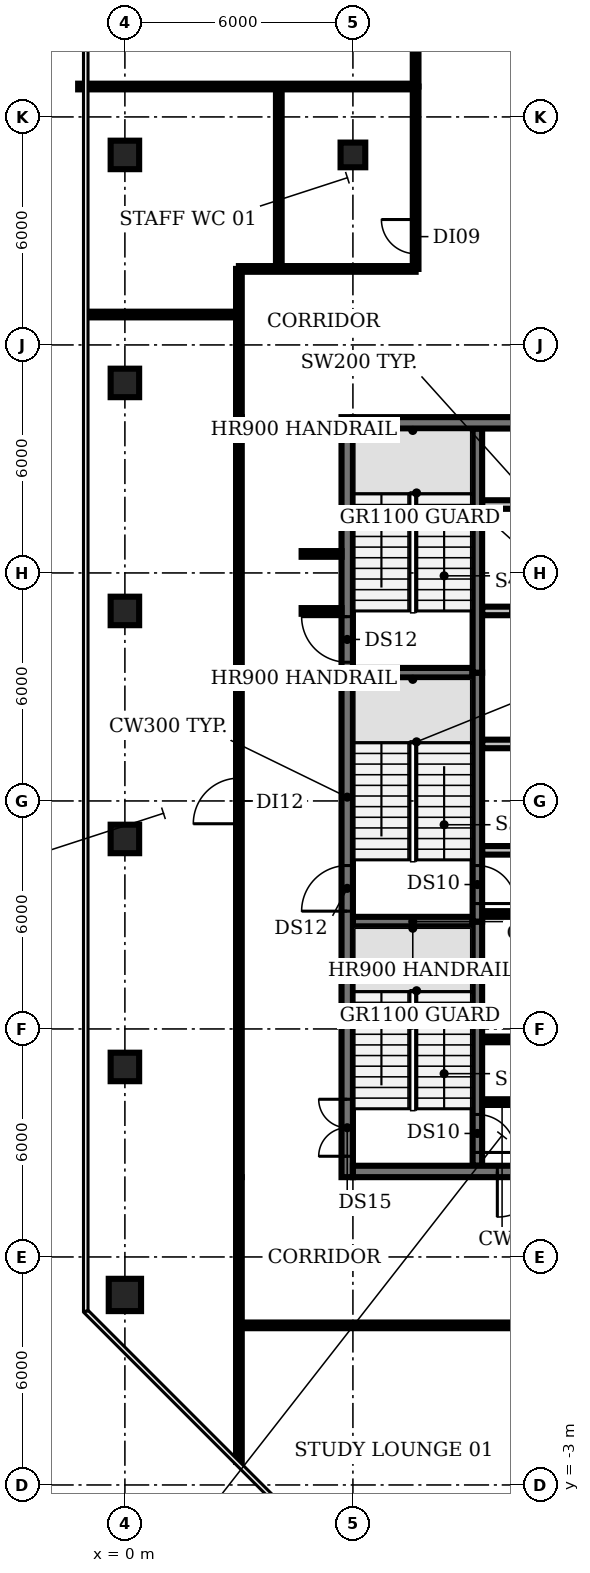
"""IFC4 building model, lengths in metres.
Left out: names, types, materials, properties, quantities, classifications, styles, units other than length and angle.
Written with IfcOpenShell. Run it as: python <this file> out.ifc"""

import sys

from ifc_helpers import new_model, si_unit, direction, frame, frame_2d, origin, origin_2d, place, context, subcontext, project, spatial, rectangle, circle, extrude, element, fill, save


model = new_model("IFC4")
c1 = context("Model", 3, precision=1e-05, world=origin(), true_north=direction((0.0, 1.0)))
c2 = subcontext(c1, "Body", "Model", "MODEL_VIEW")
j1 = project(units=[si_unit("LENGTHUNIT", "METRE"), si_unit("PLANEANGLEUNIT", "RADIAN")], contexts=[c1])
p1 = place(None, origin())
s1 = spatial("IfcSite", under=j1, at=p1, CompositionType="ELEMENT")
p2 = place(p1, origin())
s2 = spatial("IfcBuilding", under=s1, at=p2, CompositionType="ELEMENT")
p3 = place(p2, frame((0.0, 0.0, 297.8)))
s3 = spatial("IfcBuildingStorey", under=s2, at=p3, CompositionType="ELEMENT", Elevation=297.8)
p4 = place(p3, frame((0.0, 2.0, 0.0), z_axis=(0.0, 0.0, 1.0), x_axis=(1.0, 0.0, 0.0)))
e1 = element("IfcColumn", 1, at=p4, inside=s3, PredefinedType="COLUMN", context=c2, shape_type="SweptSolid", body=[
    extrude(circle(Radius=0.425, at=origin_2d()), origin(), (0.0, 0.0, 1.0), 3.85),
])
for number, where, z_axis, x_axis in (
    (2, (0.0, 8.0, 0.0), (0.0, 0.0, 1.0), (1.0, 0.0, 0.0)),
    (3, (0.0, 14.0, 0.0), (0.0, 0.0, 1.0), (1.0, 0.0, 0.0)),
    (4, (0.0, 20.0, 0.0), (0.0, 0.0, 1.0), (1.0, 0.0, 0.0)),
    (5, (0.0, 26.0, 0.0), (0.0, 0.0, 1.0), (1.0, 0.0, 0.0)),
    (6, (0.0, 32.0, 0.0), (0.0, 0.0, 1.0), (1.0, 0.0, 0.0)),
):
    element("IfcColumn", number, at=place(p3, frame(where, z_axis=z_axis, x_axis=x_axis)), inside=s3, PredefinedType="COLUMN", context=c2, shape_type="SweptSolid", body=[
        extrude(rectangle(XDim=0.75, YDim=0.75, at=origin_2d()), origin(), (0.0, 0.0, 1.0), 3.85),
    ])
p5 = place(p3, frame((6.0, 32.0, 0.0), z_axis=(0.0, 0.0, 1.0), x_axis=(1.0, 0.0, 0.0)))
e7 = element("IfcColumn", 7, at=p5, inside=s3, PredefinedType="COLUMN", context=c2, shape_type="SweptSolid", body=[
    extrude(rectangle(XDim=0.65, YDim=0.65, at=origin_2d()), origin(), (0.0, 0.0, 1.0), 3.85),
])
for number, where, z_axis, x_axis in (
    (8, (9.4, 7.075, 0.0), (0.0, 0.0, 1.0), (1.0, 0.0, 0.0)),
    (9, (9.4, 8.725, 0.0), (0.0, 0.0, 1.0), (1.0, 0.0, 0.0)),
    (10, (9.4, 10.375, 0.0), (0.0, 0.0, 1.0), (1.0, 0.0, 0.0)),
):
    element("IfcWall", number, at=place(p3, frame(where, z_axis=z_axis, x_axis=x_axis)), inside=s3, PredefinedType="SHEAR", context=c2, shape_type="SweptSolid", body=[
        extrude(rectangle(XDim=1.05, YDim=0.15, at=frame_2d((0.525, 0.0))), origin(), (0.0, 0.0, 1.0), 3.85),
    ])
p6 = place(p3, frame((6.0, 11.825, 0.0), z_axis=(0.0, 0.0, 1.0), x_axis=(1.0, 0.0, 0.0)))
e11 = element("IfcWall", 11, at=p6, inside=s3, PredefinedType="SHEAR", context=c2, shape_type="SweptSolid", body=[
    extrude(rectangle(XDim=3.15, YDim=0.25, at=frame_2d((1.575, 0.0))), origin(), (0.0, 0.0, 1.0), 3.85),
])
p7 = place(p3, frame((9.4, 12.025, 0.0), z_axis=(0.0, 0.0, 1.0), x_axis=(1.0, 0.0, 0.0)))
e12 = element("IfcWall", 12, at=p7, inside=s3, PredefinedType="SHEAR", context=c2, shape_type="SweptSolid", body=[
    extrude(rectangle(XDim=1.05, YDim=0.15, at=frame_2d((0.525, 0.0))), origin(), (0.0, 0.0, 1.0), 3.85),
])
p8 = place(p3, frame((9.4, 13.7, 0.0), z_axis=(0.0, 0.0, 1.0), x_axis=(1.0, 0.0, 0.0)))
e13 = element("IfcWall", 13, at=p8, inside=s3, PredefinedType="PARTITIONING", context=c2, shape_type="SweptSolid", body=[
    extrude(rectangle(XDim=4.0, YDim=0.225, at=frame_2d((2.0, 0.0))), origin(), (0.0, 0.0, 1.0), 3.85),
])
p9 = place(p3, frame((9.4, 16.5, 0.0), z_axis=(0.0, 0.0, 1.0), x_axis=(1.0, 0.0, 0.0)))
e14 = element("IfcWall", 14, at=p9, inside=s3, PredefinedType="PARTITIONING", context=c2, shape_type="SweptSolid", body=[
    extrude(rectangle(XDim=14.6, YDim=0.225, at=frame_2d((7.3, 0.0))), origin(), (0.0, 0.0, 1.0), 3.85),
])
p10 = place(p9, frame((1.9, 0.0, 0.0)))
e15 = element("IfcOpeningElement", 15, at=p10, cuts=e14, PredefinedType="OPENING", context=c2, shape_type="SweptSolid", body=[
    extrude(rectangle(XDim=1.0, YDim=2.1, at=frame_2d((0.5, 1.05))), frame((0.0, 0.123, 0.0), z_axis=(0.0, -1.0, 0.0), x_axis=(1.0, 0.0, 0.0)), (0.0, 0.0, 1.0), 0.245),
])
p11 = place(p9, frame((7.475, 0.0, 0.0)))
e16 = element("IfcOpeningElement", 16, at=p11, cuts=e14, PredefinedType="OPENING", context=c2, shape_type="SweptSolid", body=[
    extrude(rectangle(XDim=1.0, YDim=2.1, at=frame_2d((0.5, 1.05))), frame((0.0, 0.123, 0.0), z_axis=(0.0, -1.0, 0.0), x_axis=(1.0, 0.0, 0.0)), (0.0, 0.0, 1.0), 0.245),
])
p12 = place(p9, frame((11.308, 0.0, 0.0)))
e17 = element("IfcOpeningElement", 17, at=p12, cuts=e14, PredefinedType="OPENING", context=c2, shape_type="SweptSolid", body=[
    extrude(rectangle(XDim=0.9, YDim=2.1, at=frame_2d((0.45, 1.05))), frame((0.0, 0.123, 0.0), z_axis=(0.0, -1.0, 0.0), x_axis=(1.0, 0.0, 0.0)), (0.0, 0.0, 1.0), 0.245),
])
p13 = place(p9, frame((13.083, 0.0, 0.0)))
e18 = element("IfcOpeningElement", 18, at=p13, cuts=e14, PredefinedType="OPENING", context=c2, shape_type="SweptSolid", body=[
    extrude(rectangle(XDim=0.9, YDim=2.1, at=frame_2d((0.45, 1.05))), frame((0.0, 0.123, 0.0), z_axis=(0.0, -1.0, 0.0), x_axis=(1.0, 0.0, 0.0)), (0.0, 0.0, 1.0), 0.245),
])
p14 = place(p3, frame((6.0, 18.375, 0.0), z_axis=(0.0, 0.0, 1.0), x_axis=(1.0, 0.0, 0.0)))
e19 = element("IfcWall", 19, at=p14, inside=s3, PredefinedType="SHEAR", context=c2, shape_type="SweptSolid", body=[
    extrude(rectangle(XDim=3.15, YDim=0.25, at=frame_2d((1.575, 0.0))), origin(), (0.0, 0.0, 1.0), 3.85),
])
p15 = place(p3, frame((24.0, 20.0, 0.0), z_axis=(0.0, 0.0, 1.0), x_axis=(-1.0, 0.0, 0.0)))
e20 = element("IfcWall", 20, at=p15, inside=s3, PredefinedType="PARTITIONING", context=c2, shape_type="SweptSolid", body=[
    extrude(rectangle(XDim=14.6, YDim=0.225, at=frame_2d((7.3, 0.0))), origin(), (0.0, 0.0, 1.0), 3.85),
])
p16 = place(p15, frame((12.75, 0.0, 0.0)))
e21 = element("IfcOpeningElement", 21, at=p16, cuts=e20, PredefinedType="OPENING", context=c2, shape_type="SweptSolid", body=[
    extrude(rectangle(XDim=1.1, YDim=2.1, at=frame_2d((0.55, 1.05))), frame((0.0, 0.123, 0.0), z_axis=(0.0, -1.0, 0.0), x_axis=(1.0, 0.0, 0.0)), (0.0, 0.0, 1.0), 0.245),
])
p17 = place(p15, frame((9.95, 0.0, 0.0)))
e22 = element("IfcOpeningElement", 22, at=p17, cuts=e20, PredefinedType="OPENING", context=c2, shape_type="SweptSolid", body=[
    extrude(rectangle(XDim=1.1, YDim=2.1, at=frame_2d((0.55, 1.05))), frame((0.0, 0.123, 0.0), z_axis=(0.0, -1.0, 0.0), x_axis=(1.0, 0.0, 0.0)), (0.0, 0.0, 1.0), 0.245),
])
p18 = place(p15, frame((7.15, 0.0, 0.0)))
e23 = element("IfcOpeningElement", 23, at=p18, cuts=e20, PredefinedType="OPENING", context=c2, shape_type="SweptSolid", body=[
    extrude(rectangle(XDim=1.1, YDim=2.1, at=frame_2d((0.55, 1.05))), frame((0.0, 0.123, 0.0), z_axis=(0.0, -1.0, 0.0), x_axis=(1.0, 0.0, 0.0)), (0.0, 0.0, 1.0), 0.245),
])
p19 = place(p15, frame((4.35, 0.0, 0.0)))
e24 = element("IfcOpeningElement", 24, at=p19, cuts=e20, PredefinedType="OPENING", context=c2, shape_type="SweptSolid", body=[
    extrude(rectangle(XDim=1.1, YDim=2.1, at=frame_2d((0.55, 1.05))), frame((0.0, 0.123, 0.0), z_axis=(0.0, -1.0, 0.0), x_axis=(1.0, 0.0, 0.0)), (0.0, 0.0, 1.0), 0.245),
])
p20 = place(p15, frame((2.308, 0.0, 0.0)))
e25 = element("IfcOpeningElement", 25, at=p20, cuts=e20, PredefinedType="OPENING", context=c2, shape_type="SweptSolid", body=[
    extrude(rectangle(XDim=0.9, YDim=2.1, at=frame_2d((0.45, 1.05))), frame((0.0, 0.123, 0.0), z_axis=(0.0, -1.0, 0.0), x_axis=(1.0, 0.0, 0.0)), (0.0, 0.0, 1.0), 0.245),
])
p21 = place(p15, frame((0.633, 0.0, 0.0)))
e26 = element("IfcOpeningElement", 26, at=p21, cuts=e20, PredefinedType="OPENING", context=c2, shape_type="SweptSolid", body=[
    extrude(rectangle(XDim=0.9, YDim=2.1, at=frame_2d((0.45, 1.05))), frame((0.0, 0.123, 0.0), z_axis=(0.0, -1.0, 0.0), x_axis=(1.0, 0.0, 0.0)), (0.0, 0.0, 1.0), 0.245),
])
p22 = place(p3, frame((9.4, 22.8, 0.0), z_axis=(0.0, 0.0, 1.0), x_axis=(1.0, 0.0, 0.0)))
e27 = element("IfcWall", 27, at=p22, inside=s3, PredefinedType="PARTITIONING", context=c2, shape_type="SweptSolid", body=[
    extrude(rectangle(XDim=14.6, YDim=0.225, at=frame_2d((7.3, 0.0))), origin(), (0.0, 0.0, 1.0), 3.85),
])
p23 = place(p3, frame((9.275, 11.825, 0.0), z_axis=(0.0, 0.0, 1.0), x_axis=(0.0, -1.0, 0.0)))
e28 = element("IfcWall", 28, at=p23, inside=s3, PredefinedType="SHEAR", context=c2, shape_type="SweptSolid", body=[
    extrude(rectangle(XDim=6.425, YDim=0.25, at=frame_2d((3.212, 0.0))), origin(), (0.0, 0.0, 1.0), 3.85),
])
p24 = place(p23, frame((5.075, 0.0, 0.0)))
e29 = element("IfcOpeningElement", 29, at=p24, cuts=e28, PredefinedType="OPENING", context=c2, shape_type="SweptSolid", body=[
    extrude(rectangle(XDim=1.0, YDim=2.1, at=frame_2d((0.5, 1.05))), frame((0.0, 0.135, 0.0), z_axis=(0.0, -1.0, 0.0), x_axis=(1.0, 0.0, 0.0)), (0.0, 0.0, 1.0), 0.27),
])
p25 = place(p3, frame((9.275, 18.375, 0.0), z_axis=(0.0, 0.0, 1.0), x_axis=(0.0, -1.0, 0.0)))
e30 = element("IfcWall", 30, at=p25, inside=s3, PredefinedType="SHEAR", context=c2, shape_type="SweptSolid", body=[
    extrude(rectangle(XDim=6.55, YDim=0.25, at=frame_2d((3.275, 0.0))), origin(), (0.0, 0.0, 1.0), 3.85),
])
p26 = place(p25, frame((5.075, 0.0, 0.0)))
e31 = element("IfcOpeningElement", 31, at=p26, cuts=e30, PredefinedType="OPENING", context=c2, shape_type="SweptSolid", body=[
    extrude(rectangle(XDim=1.0, YDim=2.1, at=frame_2d((0.5, 1.05))), frame((0.0, 0.135, 0.0), z_axis=(0.0, -1.0, 0.0), x_axis=(1.0, 0.0, 0.0)), (0.0, 0.0, 1.0), 0.27),
])
p27 = place(p3, frame((9.275, 18.375, 0.0), z_axis=(0.0, 0.0, 1.0), x_axis=(0.0, 1.0, 0.0)))
e32 = element("IfcWall", 32, at=p27, inside=s3, PredefinedType="SHEAR", context=c2, shape_type="SweptSolid", body=[
    extrude(rectangle(XDim=6.425, YDim=0.25, at=frame_2d((3.212, 0.0))), origin(), (0.0, 0.0, 1.0), 3.85),
])
p28 = place(p3, frame((5.85, 5.1, 0.0), z_axis=(0.0, 0.0, 1.0), x_axis=(0.0, 1.0, 0.0)))
e33 = element("IfcWall", 33, at=p28, inside=s3, PredefinedType="SHEAR", context=c2, shape_type="SweptSolid", body=[
    extrude(rectangle(XDim=20.0, YDim=0.3, at=frame_2d((10.0, 0.0))), origin(), (0.0, 0.0, 1.0), 3.85),
])
p29 = place(p28, frame((0.55, 0.0, 0.0)))
e34 = element("IfcOpeningElement", 34, at=p29, cuts=e33, PredefinedType="OPENING", context=c2, shape_type="SweptSolid", body=[
    extrude(rectangle(XDim=1.5, YDim=2.1, at=frame_2d((0.75, 1.05))), frame((0.0, 0.16, 0.0), z_axis=(0.0, -1.0, 0.0), x_axis=(1.0, 0.0, 0.0)), (0.0, 0.0, 1.0), 0.32),
])
p30 = place(p28, frame((7.0, 0.0, 0.0)))
e35 = element("IfcOpeningElement", 35, at=p30, cuts=e33, PredefinedType="OPENING", context=c2, shape_type="SweptSolid", body=[
    extrude(rectangle(XDim=1.2, YDim=2.1, at=frame_2d((0.6, 1.05))), frame((0.0, 0.16, 0.0), z_axis=(0.0, -1.0, 0.0), x_axis=(1.0, 0.0, 0.0)), (0.0, 0.0, 1.0), 0.32),
])
p31 = place(p28, frame((13.55, 0.0, 0.0)))
e36 = element("IfcOpeningElement", 36, at=p31, cuts=e33, PredefinedType="OPENING", context=c2, shape_type="SweptSolid", body=[
    extrude(rectangle(XDim=1.2, YDim=2.1, at=frame_2d((0.6, 1.05))), frame((0.0, 0.16, 0.0), z_axis=(0.0, -1.0, 0.0), x_axis=(1.0, 0.0, 0.0)), (0.0, 0.0, 1.0), 0.32),
])
p32 = place(p3, frame((24.0, 5.25, 0.0), z_axis=(0.0, 0.0, 1.0), x_axis=(-1.0, 0.0, 0.0)))
e37 = element("IfcWall", 37, at=p32, inside=s3, PredefinedType="SHEAR", context=c2, shape_type="SweptSolid", body=[
    extrude(rectangle(XDim=18.0, YDim=0.3, at=frame_2d((9.0, 0.0))), origin(), (0.0, 0.0, 1.0), 3.85),
])
p33 = place(p32, frame((13.0, 0.0, 0.0)))
e38 = element("IfcOpeningElement", 38, at=p33, cuts=e37, PredefinedType="OPENING", context=c2, shape_type="SweptSolid", body=[
    extrude(rectangle(XDim=1.2, YDim=2.1, at=frame_2d((0.6, 1.05))), frame((0.0, 0.16, 0.0), z_axis=(0.0, -1.0, 0.0), x_axis=(1.0, 0.0, 0.0)), (0.0, 0.0, 1.0), 0.32),
])
p34 = place(p32, frame((4.9, 0.0, 0.0)))
e39 = element("IfcOpeningElement", 39, at=p34, cuts=e37, PredefinedType="OPENING", context=c2, shape_type="SweptSolid", body=[
    extrude(rectangle(XDim=1.0, YDim=2.1, at=frame_2d((0.5, 1.05))), frame((0.0, 0.16, 0.0), z_axis=(0.0, -1.0, 0.0), x_axis=(1.0, 0.0, 0.0)), (0.0, 0.0, 1.0), 0.32),
])
p35 = place(p3, frame((6.0, 24.95, 0.0), z_axis=(0.0, 0.0, 1.0), x_axis=(1.0, 0.0, 0.0)))
e40 = element("IfcWall", 40, at=p35, inside=s3, PredefinedType="SHEAR", context=c2, shape_type="SweptSolid", body=[
    extrude(rectangle(XDim=18.0, YDim=0.3, at=frame_2d((9.0, 0.0))), origin(), (0.0, 0.0, 1.0), 3.85),
])
p36 = place(p3, frame((-1.23, 33.8, 0.0), z_axis=(0.0, 0.0, 1.0), x_axis=(1.0, 0.0, 0.0)))
e41 = element("IfcWall", 41, at=p36, inside=s3, PredefinedType="PARTITIONING", context=c2, shape_type="SweptSolid", body=[
    extrude(rectangle(XDim=8.88, YDim=0.15, at=frame_2d((4.44, 0.0))), origin(), (0.0, 0.0, 1.0), 2.9),
])
p37 = place(p3, frame((-0.98, 27.8, 0.0), z_axis=(0.0, 0.0, 1.0), x_axis=(1.0, 0.0, 0.0)))
e42 = element("IfcWall", 42, at=p37, inside=s3, PredefinedType="PARTITIONING", context=c2, shape_type="SweptSolid", body=[
    extrude(rectangle(XDim=3.98, YDim=0.15, at=frame_2d((1.99, 0.0))), origin(), (0.0, 0.0, 1.0), 2.9),
])
p38 = place(p3, frame((3.0, -2.39, 0.0), z_axis=(0.0, 0.0, 1.0), x_axis=(0.0, 1.0, 0.0)))
e43 = element("IfcWall", 43, at=p38, inside=s3, PredefinedType="PARTITIONING", context=c2, shape_type="SweptSolid", body=[
    extrude(rectangle(XDim=3.59, YDim=0.15, at=frame_2d((1.795, 0.0))), origin(), (0.0, 0.0, 1.0), 2.9),
])
p39 = place(p3, frame((3.0, 1.2, 0.0), z_axis=(0.0, 0.0, 1.0), x_axis=(0.0, 1.0, 0.0)))
e44 = element("IfcWall", 44, at=p39, inside=s3, PredefinedType="PARTITIONING", context=c2, shape_type="SweptSolid", body=[
    extrude(rectangle(XDim=3.9, YDim=0.15, at=frame_2d((1.95, 0.0))), origin(), (0.0, 0.0, 1.0), 2.9),
])
p40 = place(p3, frame((3.0, 5.1, 0.0), z_axis=(0.0, 0.0, 1.0), x_axis=(0.0, 1.0, 0.0)))
e45 = element("IfcWall", 45, at=p40, inside=s3, PredefinedType="PARTITIONING", context=c2, shape_type="SweptSolid", body=[
    extrude(rectangle(XDim=20.0, YDim=0.15, at=frame_2d((10.0, 0.0))), origin(), (0.0, 0.0, 1.0), 2.9),
])
p41 = place(p40, frame((9.3, 0.0, 0.0)))
e46 = element("IfcOpeningElement", 46, at=p41, cuts=e45, PredefinedType="OPENING", context=c2, shape_type="SweptSolid", body=[
    extrude(rectangle(XDim=1.2, YDim=2.1, at=frame_2d((0.6, 1.05))), frame((0.0, 0.085, 0.0), z_axis=(0.0, -1.0, 0.0), x_axis=(1.0, 0.0, 0.0)), (0.0, 0.0, 1.0), 0.17),
])
p42 = place(p3, frame((3.0, 25.1, 0.0), z_axis=(0.0, 0.0, 1.0), x_axis=(0.0, 1.0, 0.0)))
e47 = element("IfcWall", 47, at=p42, inside=s3, PredefinedType="PARTITIONING", context=c2, shape_type="SweptSolid", body=[
    extrude(rectangle(XDim=3.9, YDim=0.15, at=frame_2d((1.95, 0.0))), origin(), (0.0, 0.0, 1.0), 2.9),
])
p43 = place(p3, frame((3.0, 29.0, 0.0), z_axis=(0.0, 0.0, 1.0), x_axis=(1.0, 0.0, 0.0)))
e48 = element("IfcWall", 48, at=p43, inside=s3, PredefinedType="PARTITIONING", context=c2, shape_type="SweptSolid", body=[
    extrude(rectangle(XDim=4.65, YDim=0.15, at=frame_2d((2.325, 0.0))), origin(), (0.0, 0.0, 1.0), 2.9),
])
p44 = place(p3, frame((4.05, 29.0, 0.0), z_axis=(0.0, 0.0, 1.0), x_axis=(0.0, 1.0, 0.0)))
e49 = element("IfcWall", 49, at=p44, inside=s3, PredefinedType="PARTITIONING", context=c2, shape_type="SweptSolid", body=[
    extrude(rectangle(XDim=4.8, YDim=0.15, at=frame_2d((2.4, 0.0))), origin(), (0.0, 0.0, 1.0), 2.9),
])
for number, where, z_axis, x_axis in (
    (50, (4.65, 20.0, 0.0), (0.0, 0.0, 1.0), (1.0, 0.0, 0.0)),
    (51, (4.65, 21.5, 0.0), (0.0, 0.0, 1.0), (1.0, 0.0, 0.0)),
):
    element("IfcWall", number, at=place(p3, frame(where, z_axis=z_axis, x_axis=x_axis)), inside=s3, PredefinedType="PARTITIONING", context=c2, shape_type="SweptSolid", body=[
        extrude(rectangle(XDim=1.05, YDim=0.15, at=frame_2d((0.525, 0.0))), origin(), (0.0, 0.0, 1.0), 2.9),
    ])
p45 = place(p3, frame((7.65, 29.0, 0.0), z_axis=(0.0, 0.0, 1.0), x_axis=(0.0, 1.0, 0.0)))
e52 = element("IfcWall", 52, at=p45, inside=s3, PredefinedType="PARTITIONING", context=c2, shape_type="SweptSolid", body=[
    extrude(rectangle(XDim=4.8, YDim=0.15, at=frame_2d((2.4, 0.0))), origin(), (0.0, 0.0, 1.0), 2.9),
])
p46 = place(p45, frame((0.4, 0.0, 0.0)))
e53 = element("IfcOpeningElement", 53, at=p46, cuts=e52, PredefinedType="OPENING", context=c2, shape_type="SweptSolid", body=[
    extrude(rectangle(XDim=0.9, YDim=2.1, at=frame_2d((0.45, 1.05))), frame((0.0, 0.085, 0.0), z_axis=(0.0, -1.0, 0.0), x_axis=(1.0, 0.0, 0.0)), (0.0, 0.0, 1.0), 0.17),
])
p47 = place(p3, frame((7.65, 33.8, 0.0), z_axis=(0.0, 0.0, 1.0), x_axis=(0.0, 1.0, 0.0)))
e54 = element("IfcWall", 54, at=p47, inside=s3, PredefinedType="PARTITIONING", context=c2, shape_type="SweptSolid", body=[
    extrude(rectangle(XDim=5.2, YDim=0.15, at=frame_2d((2.6, 0.0))), origin(), (0.0, 0.0, 1.0), 2.9),
])
p48 = place(p47, frame((2.2, 0.0, 0.0)))
e55 = element("IfcOpeningElement", 55, at=p48, cuts=e54, PredefinedType="OPENING", context=c2, shape_type="SweptSolid", body=[
    extrude(rectangle(XDim=1.0, YDim=2.1, at=frame_2d((0.5, 1.05))), frame((0.0, 0.085, 0.0), z_axis=(0.0, -1.0, 0.0), x_axis=(1.0, 0.0, 0.0)), (0.0, 0.0, 1.0), 0.17),
])
p49 = place(p3, frame((27.0, 1.2, 0.0), z_axis=(0.0, 0.0, 1.0), x_axis=(-1.0, 0.0, 0.0)))
e56 = element("IfcWall", 56, at=p49, inside=s3, PredefinedType="PARTITIONING", context=c2, shape_type="SweptSolid", body=[
    extrude(rectangle(XDim=24.0, YDim=0.15, at=frame_2d((12.0, 0.0))), origin(), (0.0, 0.0, 1.0), 2.9),
])
p50 = place(p49, frame((11.5, 0.0, 0.0)))
e57 = element("IfcOpeningElement", 57, at=p50, cuts=e56, PredefinedType="OPENING", context=c2, shape_type="SweptSolid", body=[
    extrude(rectangle(XDim=1.2, YDim=2.1, at=frame_2d((0.6, 1.05))), frame((0.0, 0.085, 0.0), z_axis=(0.0, -1.0, 0.0), x_axis=(1.0, 0.0, 0.0)), (0.0, 0.0, 1.0), 0.17),
])
p51 = place(p24, origin())
e58 = element("IfcDoor", 58, at=p51, inside=s3, OperationType="SINGLE_SWING_RIGHT", PredefinedType="DOOR", context=c2, shape_type="SweptSolid", body=[
    extrude(rectangle(XDim=1.0, YDim=2.1, at=frame_2d((0.5, 1.05))), frame((0.0, 0.025, 0.0), z_axis=(0.0, -1.0, 0.0), x_axis=(1.0, 0.0, 0.0)), (0.0, 0.0, 1.0), 0.05),
])
fill(e29, e58)
p52 = place(p26, origin())
e59 = element("IfcDoor", 59, at=p52, inside=s3, OperationType="SINGLE_SWING_RIGHT", PredefinedType="DOOR", context=c2, shape_type="SweptSolid", body=[
    extrude(rectangle(XDim=1.0, YDim=2.1, at=frame_2d((0.5, 1.05))), frame((0.0, 0.025, 0.0), z_axis=(0.0, -1.0, 0.0), x_axis=(1.0, 0.0, 0.0)), (0.0, 0.0, 1.0), 0.05),
])
fill(e31, e59)
p53 = place(p29, origin())
e60 = element("IfcDoor", 60, at=p53, inside=s3, OperationType="DOUBLE_DOOR_SINGLE_SWING", PredefinedType="DOOR", context=c2, shape_type="SweptSolid", body=[
    extrude(rectangle(XDim=1.5, YDim=2.1, at=frame_2d((0.75, 1.05))), frame((0.0, 0.025, 0.0), z_axis=(0.0, -1.0, 0.0), x_axis=(1.0, 0.0, 0.0)), (0.0, 0.0, 1.0), 0.05),
])
fill(e34, e60)
p54 = place(p30, origin())
e61 = element("IfcDoor", 61, at=p54, inside=s3, OperationType="SINGLE_SWING_LEFT", PredefinedType="DOOR", context=c2, shape_type="SweptSolid", body=[
    extrude(rectangle(XDim=1.2, YDim=2.1, at=frame_2d((0.6, 1.05))), frame((0.0, 0.025, 0.0), z_axis=(0.0, -1.0, 0.0), x_axis=(1.0, 0.0, 0.0)), (0.0, 0.0, 1.0), 0.05),
])
fill(e35, e61)
p55 = place(p31, origin())
e62 = element("IfcDoor", 62, at=p55, inside=s3, OperationType="SINGLE_SWING_RIGHT", PredefinedType="DOOR", context=c2, shape_type="SweptSolid", body=[
    extrude(rectangle(XDim=1.2, YDim=2.1, at=frame_2d((0.6, 1.05))), frame((0.0, 0.025, 0.0), z_axis=(0.0, -1.0, 0.0), x_axis=(1.0, 0.0, 0.0)), (0.0, 0.0, 1.0), 0.05),
])
fill(e36, e62)
p56 = place(p33, origin())
e63 = element("IfcDoor", 63, at=p56, inside=s3, OperationType="SINGLE_SWING_RIGHT", PredefinedType="DOOR", context=c2, shape_type="SweptSolid", body=[
    extrude(rectangle(XDim=1.2, YDim=2.1, at=frame_2d((0.6, 1.05))), frame((0.0, 0.025, 0.0), z_axis=(0.0, -1.0, 0.0), x_axis=(1.0, 0.0, 0.0)), (0.0, 0.0, 1.0), 0.05),
])
fill(e38, e63)
p57 = place(p41, origin())
e64 = element("IfcDoor", 64, at=p57, inside=s3, OperationType="SINGLE_SWING_LEFT", PredefinedType="DOOR", context=c2, shape_type="SweptSolid", body=[
    extrude(rectangle(XDim=1.2, YDim=2.1, at=frame_2d((0.6, 1.05))), frame((0.0, 0.025, 0.0), z_axis=(0.0, -1.0, 0.0), x_axis=(1.0, 0.0, 0.0)), (0.0, 0.0, 1.0), 0.05),
])
fill(e46, e64)
p58 = place(p46, origin())
e65 = element("IfcDoor", 65, at=p58, inside=s3, OperationType="SINGLE_SWING_RIGHT", PredefinedType="DOOR", context=c2, shape_type="SweptSolid", body=[
    extrude(rectangle(XDim=0.9, YDim=2.1, at=frame_2d((0.45, 1.05))), frame((0.0, 0.025, 0.0), z_axis=(0.0, -1.0, 0.0), x_axis=(1.0, 0.0, 0.0)), (0.0, 0.0, 1.0), 0.05),
])
fill(e53, e65)
save(model, sys.argv[1])
